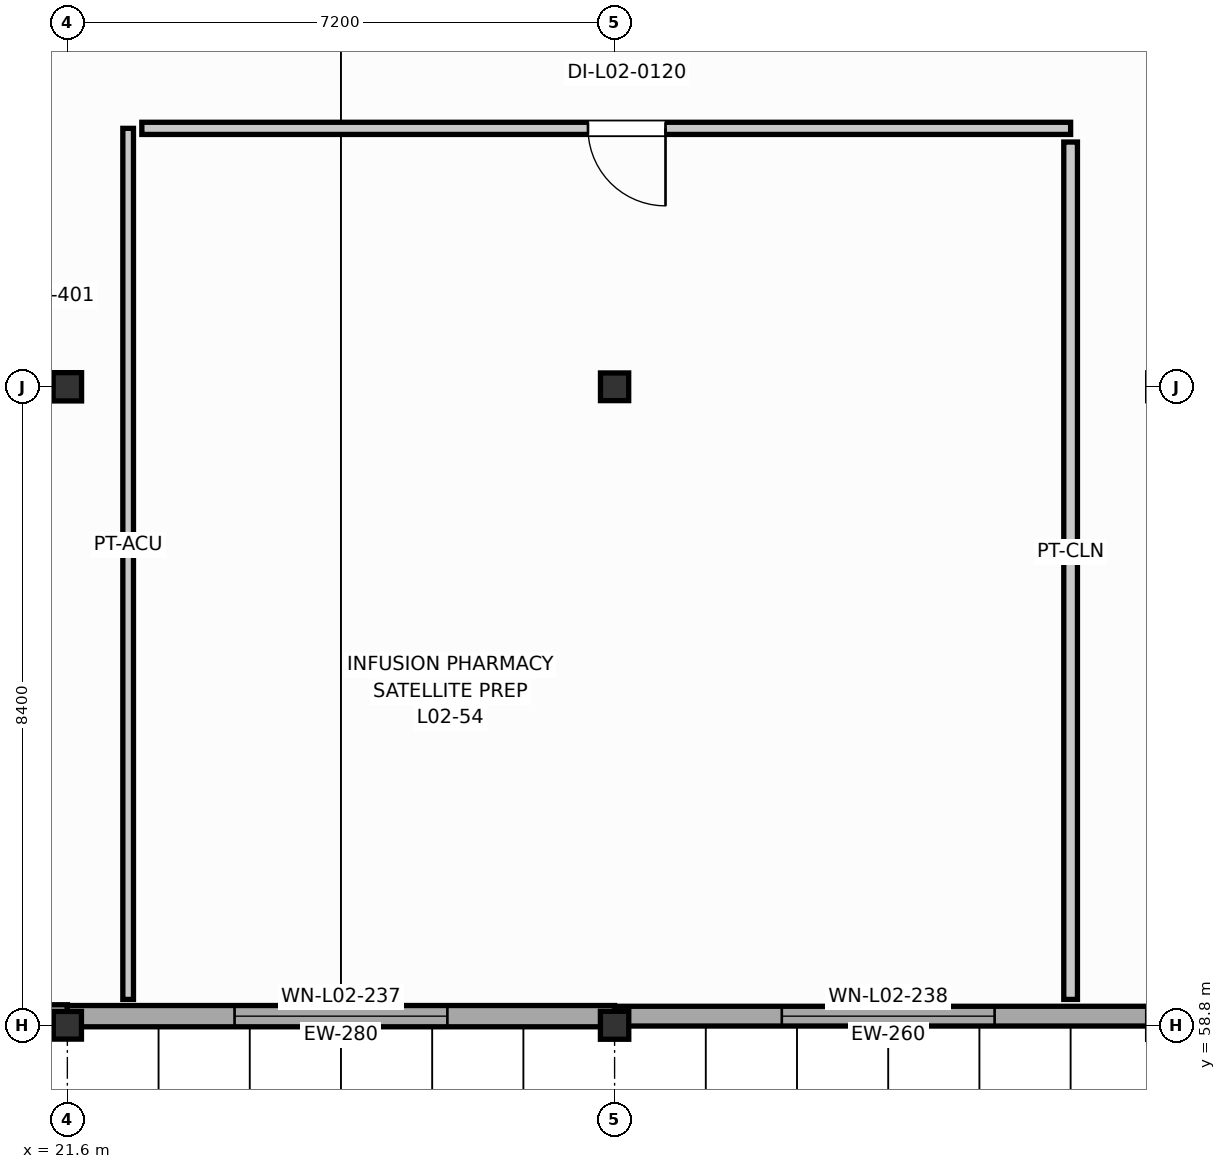
"""IFC4 building model, lengths in metres.
Left out: names, types, materials, properties, quantities, classifications, styles, units other than length and angle.
Written with IfcOpenShell. Run it as: python <this file> out.ifc"""

import sys

from ifc_helpers import new_model, si_unit, direction, frame, frame_2d, origin, origin_2d, place, context, subcontext, project, spatial, rectangle, i_section, extrude, element, fill, save


model = new_model("IFC4")
c1 = context("Model", 3, precision=1e-05, world=origin(), true_north=direction((0.0, 1.0)))
c2 = subcontext(c1, "Body", "Model", "MODEL_VIEW")
j1 = project(units=[si_unit("LENGTHUNIT", "METRE"), si_unit("PLANEANGLEUNIT", "RADIAN")], contexts=[c1])
p1 = place(None, origin())
s1 = spatial("IfcSite", under=j1, at=p1, CompositionType="ELEMENT")
p2 = place(p1, origin())
s2 = spatial("IfcBuilding", under=s1, at=p2, CompositionType="ELEMENT")
p3 = place(p2, frame((0.0, 0.0, 9.0)))
s3 = spatial("IfcBuildingStorey", under=s2, at=p3, CompositionType="ELEMENT", Elevation=9.0)
p4 = place(p3, frame((21.6, 58.8, 0.0), z_axis=(0.0, 0.0, 1.0), x_axis=(1.0, 0.0, 0.0)))
e1 = element("IfcColumn", 1, at=p4, inside=s3, PredefinedType="COLUMN", context=c2, shape_type="SweptSolid", body=[
    extrude(i_section(OverallWidth=0.371, OverallDepth=0.364, WebThickness=0.013, FlangeThickness=0.022, FilletRadius=0.02, at=origin_2d()), origin(), (0.0, 0.0, 1.0), 4.2),
])
p5 = place(p3, frame((21.6, 67.2, 0.0), z_axis=(0.0, 0.0, 1.0), x_axis=(1.0, 0.0, 0.0)))
e2 = element("IfcColumn", 2, at=p5, inside=s3, PredefinedType="COLUMN", context=c2, shape_type="SweptSolid", body=[
    extrude(i_section(OverallWidth=0.374, OverallDepth=0.372, WebThickness=0.016, FlangeThickness=0.026, FilletRadius=0.02, at=origin_2d()), origin(), (0.0, 0.0, 1.0), 4.2),
])
p6 = place(p3, frame((28.8, 58.8, 0.0), z_axis=(0.0, 0.0, 1.0), x_axis=(1.0, 0.0, 0.0)))
e3 = element("IfcColumn", 3, at=p6, inside=s3, PredefinedType="COLUMN", context=c2, shape_type="SweptSolid", body=[
    extrude(i_section(OverallWidth=0.373, OverallDepth=0.368, WebThickness=0.015, FlangeThickness=0.024, FilletRadius=0.02, at=origin_2d()), origin(), (0.0, 0.0, 1.0), 4.2),
])
p7 = place(p3, frame((28.8, 67.2, 0.0), z_axis=(0.0, 0.0, 1.0), x_axis=(1.0, 0.0, 0.0)))
e4 = element("IfcColumn", 4, at=p7, inside=s3, PredefinedType="COLUMN", context=c2, shape_type="SweptSolid", body=[
    extrude(i_section(OverallWidth=0.371, OverallDepth=0.364, WebThickness=0.013, FlangeThickness=0.022, FilletRadius=0.02, at=origin_2d()), origin(), (0.0, 0.0, 1.0), 4.2),
])
p8 = place(p3, frame((14.4, 58.92, 0.0), z_axis=(0.0, 0.0, 1.0), x_axis=(1.0, 0.0, 0.0)))
e5 = element("IfcWall", 5, at=p8, inside=s3, PredefinedType="SOLIDWALL", context=c2, shape_type="SweptSolid", body=[
    extrude(rectangle(XDim=7.2, YDim=0.3, at=frame_2d((3.6, 0.0))), origin(), (0.0, 0.0, 1.0), 3.529),
])
p9 = place(p8, frame((2.3, 0.0, 0.95)))
e6 = element("IfcOpeningElement", 6, at=p9, cuts=e5, PredefinedType="OPENING", context=c2, shape_type="SweptSolid", body=[
    extrude(rectangle(XDim=2.6, YDim=1.75, at=frame_2d((1.3, 0.875))), frame((0.0, 0.16, 0.0), z_axis=(0.0, -1.0, 0.0), x_axis=(1.0, 0.0, 0.0)), (0.0, 0.0, 1.0), 0.32),
])
p10 = place(p3, frame((21.6, 58.92, 0.0), z_axis=(0.0, 0.0, 1.0), x_axis=(1.0, 0.0, 0.0)))
e7 = element("IfcWall", 7, at=p10, inside=s3, PredefinedType="SOLIDWALL", context=c2, shape_type="SweptSolid", body=[
    extrude(rectangle(XDim=7.2, YDim=0.28, at=frame_2d((3.6, 0.0))), origin(), (0.0, 0.0, 1.0), 3.482),
])
p11 = place(p10, frame((2.2, 0.0, 0.95)))
e8 = element("IfcOpeningElement", 8, at=p11, cuts=e7, PredefinedType="OPENING", context=c2, shape_type="SweptSolid", body=[
    extrude(rectangle(XDim=2.8, YDim=1.15, at=frame_2d((1.4, 0.575))), frame((0.0, 0.15, 0.0), z_axis=(0.0, -1.0, 0.0), x_axis=(1.0, 0.0, 0.0)), (0.0, 0.0, 1.0), 0.3),
])
p12 = place(p3, frame((28.8, 58.92, 0.0), z_axis=(0.0, 0.0, 1.0), x_axis=(1.0, 0.0, 0.0)))
e9 = element("IfcWall", 9, at=p12, inside=s3, PredefinedType="SOLIDWALL", context=c2, shape_type="SweptSolid", body=[
    extrude(rectangle(XDim=7.2, YDim=0.26, at=frame_2d((3.6, 0.0))), origin(), (0.0, 0.0, 1.0), 3.482),
])
p13 = place(p12, frame((2.2, 0.0, 0.95)))
e10 = element("IfcOpeningElement", 10, at=p13, cuts=e9, PredefinedType="OPENING", context=c2, shape_type="SweptSolid", body=[
    extrude(rectangle(XDim=2.8, YDim=1.35, at=frame_2d((1.4, 0.675))), frame((0.0, 0.14, 0.0), z_axis=(0.0, -1.0, 0.0), x_axis=(1.0, 0.0, 0.0)), (0.0, 0.0, 1.0), 0.28),
])
p14 = place(p3, frame((22.4, 59.14, 0.0), z_axis=(0.0, 0.0, 1.0), x_axis=(0.0, 1.0, 0.0)))
e11 = element("IfcWall", 11, at=p14, inside=s3, PredefinedType="PARTITIONING", context=c2, shape_type="SweptSolid", body=[
    extrude(rectangle(XDim=11.46, YDim=0.14, at=frame_2d((5.73, 0.0))), origin(), (0.0, 0.0, 1.0), 3.535),
])
p15 = place(p3, frame((22.58, 70.6, 0.0), z_axis=(0.0, 0.0, 1.0), x_axis=(1.0, 0.0, 0.0)))
e12 = element("IfcWall", 12, at=p15, inside=s3, PredefinedType="PARTITIONING", context=c2, shape_type="SweptSolid", body=[
    extrude(rectangle(XDim=12.22, YDim=0.16, at=frame_2d((6.11, 0.0))), origin(), (0.0, 0.0, 1.0), 3.945),
])
p16 = place(p15, frame((5.87, 0.0, 0.0)))
e13 = element("IfcOpeningElement", 13, at=p16, cuts=e12, PredefinedType="OPENING", context=c2, shape_type="SweptSolid", body=[
    extrude(rectangle(XDim=1.02, YDim=2.05, at=frame_2d((0.51, 1.025))), frame((0.0, 0.09, 0.0), z_axis=(0.0, -1.0, 0.0), x_axis=(1.0, 0.0, 0.0)), (0.0, 0.0, 1.0), 0.18),
])
p17 = place(p3, frame((34.8, 70.42, 0.0), z_axis=(0.0, 0.0, 1.0), x_axis=(0.0, -1.0, 0.0)))
e14 = element("IfcWall", 14, at=p17, inside=s3, PredefinedType="PARTITIONING", context=c2, shape_type="SweptSolid", body=[
    extrude(rectangle(XDim=11.28, YDim=0.18, at=frame_2d((5.64, 0.0))), origin(), (0.0, 0.0, 1.0), 3.252),
])
p18 = place(p11, origin())
e15 = element("IfcWindow", 15, at=p18, inside=s3, PartitioningType="SINGLE_PANEL", PredefinedType="WINDOW", context=c2, shape_type="SweptSolid", body=[
    extrude(rectangle(XDim=2.8, YDim=1.15, at=frame_2d((1.4, 0.575))), frame((0.0, 0.03, 0.0), z_axis=(0.0, -1.0, 0.0), x_axis=(1.0, 0.0, 0.0)), (0.0, 0.0, 1.0), 0.06),
])
fill(e8, e15)
p19 = place(p13, origin())
e16 = element("IfcWindow", 16, at=p19, inside=s3, PartitioningType="SINGLE_PANEL", PredefinedType="WINDOW", context=c2, shape_type="SweptSolid", body=[
    extrude(rectangle(XDim=2.8, YDim=1.35, at=frame_2d((1.4, 0.675))), frame((0.0, 0.03, 0.0), z_axis=(0.0, -1.0, 0.0), x_axis=(1.0, 0.0, 0.0)), (0.0, 0.0, 1.0), 0.06),
])
fill(e10, e16)
p20 = place(p16, frame((1.02, 0.0, 0.0), z_axis=(0.0, 0.0, 1.0), x_axis=(-1.0, 0.0, 0.0)))
e17 = element("IfcDoor", 17, at=p20, inside=s3, OperationType="SINGLE_SWING_LEFT", PredefinedType="DOOR", context=c2, shape_type="SweptSolid", body=[
    extrude(rectangle(XDim=1.02, YDim=2.05, at=frame_2d((0.51, 1.025))), frame((0.0, 0.025, 0.0), z_axis=(0.0, -1.0, 0.0), x_axis=(1.0, 0.0, 0.0)), (0.0, 0.0, 1.0), 0.05),
])
fill(e13, e17)
save(model, sys.argv[1])
